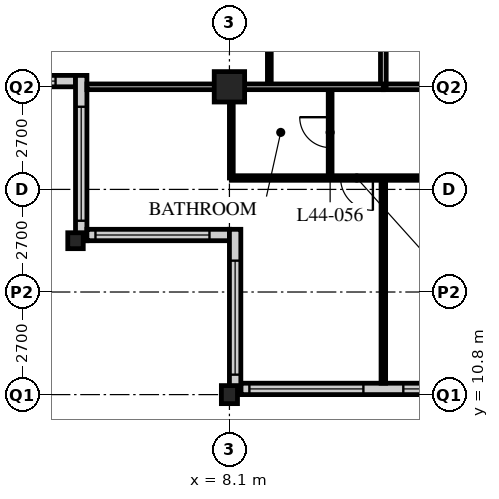
"""IFC4 building model, lengths in metres.
Left out: names, types, materials, properties, quantities, classifications, styles, units other than length and angle.
Written with IfcOpenShell. Run it as: python <this file> out.ifc"""

import sys

from ifc_helpers import new_model, si_unit, direction, frame, frame_2d, origin, origin_2d, place, context, subcontext, project, spatial, rectangle, hollow_rectangle, i_section, extrude, element, fill, save


model = new_model("IFC4")
c1 = context("Model", 3, precision=1e-05, world=origin(), true_north=direction((0.0, 1.0)))
c2 = subcontext(c1, "Body", "Model", "MODEL_VIEW")
j1 = project(units=[si_unit("LENGTHUNIT", "METRE"), si_unit("PLANEANGLEUNIT", "RADIAN")], contexts=[c1])
p1 = place(None, origin())
s1 = spatial("IfcSite", under=j1, at=p1, CompositionType="ELEMENT")
p2 = place(p1, origin())
s2 = spatial("IfcBuilding", under=s1, at=p2, CompositionType="ELEMENT")
p3 = place(p2, frame((0.0, 0.0, 174.0)))
s3 = spatial("IfcBuildingStorey", under=s2, at=p3, CompositionType="ELEMENT", Elevation=174.0)
p4 = place(p3, frame((4.05, 14.85, 0.0), z_axis=(0.0, 0.0, 1.0), x_axis=(1.0, 0.0, 0.0)))
e1 = element("IfcColumn", 1, at=p4, inside=s3, PredefinedType="COLUMN", context=c2, shape_type="SweptSolid", body=[
    extrude(i_section(OverallWidth=0.407, OverallDepth=0.419, WebThickness=0.031, FlangeThickness=0.049, FilletRadius=0.015, at=origin_2d()), origin(), (0.0, 0.0, 1.0), 3.6),
])
p5 = place(p3, frame((8.1, 10.8, 0.0), z_axis=(0.0, 0.0, 1.0), x_axis=(1.0, 0.0, 0.0)))
e2 = element("IfcColumn", 2, at=p5, inside=s3, PredefinedType="COLUMN", context=c2, shape_type="SweptSolid", body=[
    extrude(i_section(OverallWidth=0.424, OverallDepth=0.475, WebThickness=0.048, FlangeThickness=0.077, FilletRadius=0.015, at=origin_2d()), origin(), (0.0, 0.0, 1.0), 3.6),
])
p6 = place(p3, frame((8.1, 18.9, 0.0), z_axis=(0.0, 0.0, 1.0), x_axis=(1.0, 0.0, 0.0)))
e3 = element("IfcColumn", 3, at=p6, inside=s3, PredefinedType="COLUMN", context=c2, shape_type="SweptSolid", body=[
    extrude(hollow_rectangle(XDim=0.8, YDim=0.8, WallThickness=0.08, at=origin_2d()), origin(), (0.0, 0.0, 1.0), 3.6),
])
p7 = place(p3, frame((8.4, 10.95, 0.0), z_axis=(0.0, 0.0, 1.0), x_axis=(1.0, 0.0, 0.0)))
e4 = element("IfcWall", 4, at=p7, inside=s3, PredefinedType="SOLIDWALL", context=c2, shape_type="SweptSolid", body=[
    extrude(rectangle(XDim=40.2, YDim=0.3, at=frame_2d((20.1, 0.0))), origin(), (0.0, 0.0, 1.0), 3.39),
])
p8 = place(p7, frame((0.225, 0.0, 0.6)))
e5 = element("IfcOpeningElement", 5, at=p8, cuts=e4, PredefinedType="OPENING", context=c2, shape_type="SweptSolid", body=[
    extrude(rectangle(XDim=3.0, YDim=2.4, at=frame_2d((1.5, 1.2))), frame((0.0, 0.16, 0.0), z_axis=(0.0, -1.0, 0.0), x_axis=(1.0, 0.0, 0.0)), (0.0, 0.0, 1.0), 0.32),
])
p9 = place(p7, frame((4.275, 0.0, 0.6)))
e6 = element("IfcOpeningElement", 6, at=p9, cuts=e4, PredefinedType="OPENING", context=c2, shape_type="SweptSolid", body=[
    extrude(rectangle(XDim=3.0, YDim=2.4, at=frame_2d((1.5, 1.2))), frame((0.0, 0.16, 0.0), z_axis=(0.0, -1.0, 0.0), x_axis=(1.0, 0.0, 0.0)), (0.0, 0.0, 1.0), 0.32),
])
p10 = place(p7, frame((8.325, 0.0, 0.6)))
e7 = element("IfcOpeningElement", 7, at=p10, cuts=e4, PredefinedType="OPENING", context=c2, shape_type="SweptSolid", body=[
    extrude(rectangle(XDim=3.0, YDim=2.4, at=frame_2d((1.5, 1.2))), frame((0.0, 0.16, 0.0), z_axis=(0.0, -1.0, 0.0), x_axis=(1.0, 0.0, 0.0)), (0.0, 0.0, 1.0), 0.32),
])
p11 = place(p7, frame((12.375, 0.0, 0.6)))
e8 = element("IfcOpeningElement", 8, at=p11, cuts=e4, PredefinedType="OPENING", context=c2, shape_type="SweptSolid", body=[
    extrude(rectangle(XDim=3.0, YDim=2.4, at=frame_2d((1.5, 1.2))), frame((0.0, 0.16, 0.0), z_axis=(0.0, -1.0, 0.0), x_axis=(1.0, 0.0, 0.0)), (0.0, 0.0, 1.0), 0.32),
])
p12 = place(p7, frame((16.425, 0.0, 0.6)))
e9 = element("IfcOpeningElement", 9, at=p12, cuts=e4, PredefinedType="OPENING", context=c2, shape_type="SweptSolid", body=[
    extrude(rectangle(XDim=3.0, YDim=2.4, at=frame_2d((1.5, 1.2))), frame((0.0, 0.16, 0.0), z_axis=(0.0, -1.0, 0.0), x_axis=(1.0, 0.0, 0.0)), (0.0, 0.0, 1.0), 0.32),
])
p13 = place(p7, frame((20.475, 0.0, 0.6)))
e10 = element("IfcOpeningElement", 10, at=p13, cuts=e4, PredefinedType="OPENING", context=c2, shape_type="SweptSolid", body=[
    extrude(rectangle(XDim=3.0, YDim=2.4, at=frame_2d((1.5, 1.2))), frame((0.0, 0.16, 0.0), z_axis=(0.0, -1.0, 0.0), x_axis=(1.0, 0.0, 0.0)), (0.0, 0.0, 1.0), 0.32),
])
p14 = place(p7, frame((24.525, 0.0, 0.6)))
e11 = element("IfcOpeningElement", 11, at=p14, cuts=e4, PredefinedType="OPENING", context=c2, shape_type="SweptSolid", body=[
    extrude(rectangle(XDim=3.0, YDim=2.4, at=frame_2d((1.5, 1.2))), frame((0.0, 0.16, 0.0), z_axis=(0.0, -1.0, 0.0), x_axis=(1.0, 0.0, 0.0)), (0.0, 0.0, 1.0), 0.32),
])
p15 = place(p7, frame((28.575, 0.0, 0.6)))
e12 = element("IfcOpeningElement", 12, at=p15, cuts=e4, PredefinedType="OPENING", context=c2, shape_type="SweptSolid", body=[
    extrude(rectangle(XDim=3.0, YDim=2.4, at=frame_2d((1.5, 1.2))), frame((0.0, 0.16, 0.0), z_axis=(0.0, -1.0, 0.0), x_axis=(1.0, 0.0, 0.0)), (0.0, 0.0, 1.0), 0.32),
])
p16 = place(p7, frame((32.625, 0.0, 0.6)))
e13 = element("IfcOpeningElement", 13, at=p16, cuts=e4, PredefinedType="OPENING", context=c2, shape_type="SweptSolid", body=[
    extrude(rectangle(XDim=3.0, YDim=2.4, at=frame_2d((1.5, 1.2))), frame((0.0, 0.16, 0.0), z_axis=(0.0, -1.0, 0.0), x_axis=(1.0, 0.0, 0.0)), (0.0, 0.0, 1.0), 0.32),
])
p17 = place(p7, frame((36.675, 0.0, 0.6)))
e14 = element("IfcOpeningElement", 14, at=p17, cuts=e4, PredefinedType="OPENING", context=c2, shape_type="SweptSolid", body=[
    extrude(rectangle(XDim=3.0, YDim=2.4, at=frame_2d((1.5, 1.2))), frame((0.0, 0.16, 0.0), z_axis=(0.0, -1.0, 0.0), x_axis=(1.0, 0.0, 0.0)), (0.0, 0.0, 1.0), 0.32),
])
p18 = place(p3, frame((0.3, 19.05, 0.0), z_axis=(0.0, 0.0, 1.0), x_axis=(1.0, 0.0, 0.0)))
e15 = element("IfcWall", 15, at=p18, inside=s3, PredefinedType="SOLIDWALL", context=c2, shape_type="SweptSolid", body=[
    extrude(rectangle(XDim=3.75, YDim=0.3, at=frame_2d((1.875, 0.0))), origin(), (0.0, 0.0, 1.0), 3.39),
])
p19 = place(p18, frame((0.225, 0.0, 0.6)))
e16 = element("IfcOpeningElement", 16, at=p19, cuts=e15, PredefinedType="OPENING", context=c2, shape_type="SweptSolid", body=[
    extrude(rectangle(XDim=3.0, YDim=2.0, at=frame_2d((1.5, 1.0))), frame((0.0, 0.16, 0.0), z_axis=(0.0, -1.0, 0.0), x_axis=(1.0, 0.0, 0.0)), (0.0, 0.0, 1.0), 0.32),
])
p20 = place(p3, frame((4.2, 19.2, 0.0), z_axis=(0.0, 0.0, 1.0), x_axis=(0.0, -1.0, 0.0)))
e17 = element("IfcWall", 17, at=p20, inside=s3, PredefinedType="SOLIDWALL", context=c2, shape_type="SweptSolid", body=[
    extrude(rectangle(XDim=4.35, YDim=0.3, at=frame_2d((2.175, 0.0))), origin(), (0.0, 0.0, 1.0), 3.39),
])
p21 = place(p20, frame((0.825, 0.0, 0.6)))
e18 = element("IfcOpeningElement", 18, at=p21, cuts=e17, PredefinedType="OPENING", context=c2, shape_type="SweptSolid", body=[
    extrude(rectangle(XDim=3.0, YDim=2.0, at=frame_2d((1.5, 1.0))), frame((0.0, 0.16, 0.0), z_axis=(0.0, -1.0, 0.0), x_axis=(1.0, 0.0, 0.0)), (0.0, 0.0, 1.0), 0.32),
])
p22 = place(p3, frame((4.35, 15.0, 0.0), z_axis=(0.0, 0.0, 1.0), x_axis=(1.0, 0.0, 0.0)))
e19 = element("IfcWall", 19, at=p22, inside=s3, PredefinedType="SOLIDWALL", context=c2, shape_type="SweptSolid", body=[
    extrude(rectangle(XDim=3.75, YDim=0.3, at=frame_2d((1.875, 0.0))), origin(), (0.0, 0.0, 1.0), 3.39),
])
p23 = place(p22, frame((0.225, 0.0, 0.6)))
e20 = element("IfcOpeningElement", 20, at=p23, cuts=e19, PredefinedType="OPENING", context=c2, shape_type="SweptSolid", body=[
    extrude(rectangle(XDim=3.0, YDim=2.0, at=frame_2d((1.5, 1.0))), frame((0.0, 0.16, 0.0), z_axis=(0.0, -1.0, 0.0), x_axis=(1.0, 0.0, 0.0)), (0.0, 0.0, 1.0), 0.32),
])
p24 = place(p3, frame((8.25, 15.15, 0.0), z_axis=(0.0, 0.0, 1.0), x_axis=(0.0, -1.0, 0.0)))
e21 = element("IfcWall", 21, at=p24, inside=s3, PredefinedType="SOLIDWALL", context=c2, shape_type="SweptSolid", body=[
    extrude(rectangle(XDim=4.35, YDim=0.3, at=frame_2d((2.175, 0.0))), origin(), (0.0, 0.0, 1.0), 3.39),
])
p25 = place(p24, frame((0.825, 0.0, 0.6)))
e22 = element("IfcOpeningElement", 22, at=p25, cuts=e21, PredefinedType="OPENING", context=c2, shape_type="SweptSolid", body=[
    extrude(rectangle(XDim=3.0, YDim=2.0, at=frame_2d((1.5, 1.0))), frame((0.0, 0.16, 0.0), z_axis=(0.0, -1.0, 0.0), x_axis=(1.0, 0.0, 0.0)), (0.0, 0.0, 1.0), 0.32),
])
p26 = place(p3, frame((12.15, 18.9, 0.0), z_axis=(0.0, 0.0, 1.0), x_axis=(1.0, 0.0, 0.0)))
e23 = element("IfcWall", 23, at=p26, inside=s3, PredefinedType="PARTITIONING", context=c2, shape_type="SweptSolid", body=[
    extrude(rectangle(XDim=32.4, YDim=0.15, at=frame_2d((16.2, 0.0))), origin(), (0.0, 0.0, 1.0), 2.778),
])
p27 = place(p26, frame((6.4, 0.0, 0.0)))
e24 = element("IfcOpeningElement", 24, at=p27, cuts=e23, PredefinedType="OPENING", context=c2, shape_type="SweptSolid", body=[
    extrude(rectangle(XDim=1.0, YDim=2.1, at=frame_2d((0.5, 1.05))), frame((0.0, 0.085, 0.0), z_axis=(0.0, -1.0, 0.0), x_axis=(1.0, 0.0, 0.0)), (0.0, 0.0, 1.0), 0.17),
])
p28 = place(p26, frame((8.8, 0.0, 0.0)))
e25 = element("IfcOpeningElement", 25, at=p28, cuts=e23, PredefinedType="OPENING", context=c2, shape_type="SweptSolid", body=[
    extrude(rectangle(XDim=1.0, YDim=2.1, at=frame_2d((0.5, 1.05))), frame((0.0, 0.085, 0.0), z_axis=(0.0, -1.0, 0.0), x_axis=(1.0, 0.0, 0.0)), (0.0, 0.0, 1.0), 0.17),
])
p29 = place(p26, frame((13.05, 0.0, 0.0)))
e26 = element("IfcOpeningElement", 26, at=p29, cuts=e23, PredefinedType="OPENING", context=c2, shape_type="SweptSolid", body=[
    extrude(rectangle(XDim=1.0, YDim=2.1, at=frame_2d((0.5, 1.05))), frame((0.0, 0.085, 0.0), z_axis=(0.0, -1.0, 0.0), x_axis=(1.0, 0.0, 0.0)), (0.0, 0.0, 1.0), 0.17),
])
p30 = place(p26, frame((22.6, 0.0, 0.0)))
e27 = element("IfcOpeningElement", 27, at=p30, cuts=e23, PredefinedType="OPENING", context=c2, shape_type="SweptSolid", body=[
    extrude(rectangle(XDim=1.0, YDim=2.1, at=frame_2d((0.5, 1.05))), frame((0.0, 0.085, 0.0), z_axis=(0.0, -1.0, 0.0), x_axis=(1.0, 0.0, 0.0)), (0.0, 0.0, 1.0), 0.17),
])
p31 = place(p26, frame((25.0, 0.0, 0.0)))
e28 = element("IfcOpeningElement", 28, at=p31, cuts=e23, PredefinedType="OPENING", context=c2, shape_type="SweptSolid", body=[
    extrude(rectangle(XDim=1.0, YDim=2.1, at=frame_2d((0.5, 1.05))), frame((0.0, 0.085, 0.0), z_axis=(0.0, -1.0, 0.0), x_axis=(1.0, 0.0, 0.0)), (0.0, 0.0, 1.0), 0.17),
])
p32 = place(p26, frame((1.525, 0.0, 0.0)))
e29 = element("IfcOpeningElement", 29, at=p32, cuts=e23, PredefinedType="OPENING", context=c2, shape_type="SweptSolid", body=[
    extrude(rectangle(XDim=1.0, YDim=2.1, at=frame_2d((0.5, 1.05))), frame((0.0, 0.085, 0.0), z_axis=(0.0, -1.0, 0.0), x_axis=(1.0, 0.0, 0.0)), (0.0, 0.0, 1.0), 0.17),
])
p33 = place(p26, frame((29.875, 0.0, 0.0)))
e30 = element("IfcOpeningElement", 30, at=p33, cuts=e23, PredefinedType="OPENING", context=c2, shape_type="SweptSolid", body=[
    extrude(rectangle(XDim=1.0, YDim=2.1, at=frame_2d((0.5, 1.05))), frame((0.0, 0.085, 0.0), z_axis=(0.0, -1.0, 0.0), x_axis=(1.0, 0.0, 0.0)), (0.0, 0.0, 1.0), 0.17),
])
p34 = place(p3, frame((12.15, 18.9, 0.0), z_axis=(0.0, 0.0, 1.0), x_axis=(0.0, 1.0, 0.0)))
e31 = element("IfcWall", 31, at=p34, inside=s3, PredefinedType="PARTITIONING", context=c2, shape_type="SweptSolid", body=[
    extrude(rectangle(XDim=24.3, YDim=0.15, at=frame_2d((12.15, 0.0))), origin(), (0.0, 0.0, 1.0), 3.39),
])
p35 = place(p34, frame((2.35, 0.0, 0.0)))
e32 = element("IfcOpeningElement", 32, at=p35, cuts=e31, PredefinedType="OPENING", context=c2, shape_type="SweptSolid", body=[
    extrude(rectangle(XDim=1.0, YDim=2.1, at=frame_2d((0.5, 1.05))), frame((0.0, 0.085, 0.0), z_axis=(0.0, -1.0, 0.0), x_axis=(1.0, 0.0, 0.0)), (0.0, 0.0, 1.0), 0.17),
])
p36 = place(p34, frame((6.4, 0.0, 0.0)))
e33 = element("IfcOpeningElement", 33, at=p36, cuts=e31, PredefinedType="OPENING", context=c2, shape_type="SweptSolid", body=[
    extrude(rectangle(XDim=1.0, YDim=2.1, at=frame_2d((0.5, 1.05))), frame((0.0, 0.085, 0.0), z_axis=(0.0, -1.0, 0.0), x_axis=(1.0, 0.0, 0.0)), (0.0, 0.0, 1.0), 0.17),
])
p37 = place(p34, frame((8.5, 0.0, 0.0)))
e34 = element("IfcOpeningElement", 34, at=p37, cuts=e31, PredefinedType="OPENING", context=c2, shape_type="SweptSolid", body=[
    extrude(rectangle(XDim=1.0, YDim=2.1, at=frame_2d((0.5, 1.05))), frame((0.0, 0.085, 0.0), z_axis=(0.0, -1.0, 0.0), x_axis=(1.0, 0.0, 0.0)), (0.0, 0.0, 1.0), 0.17),
])
p38 = place(p34, frame((16.6, 0.0, 0.0)))
e35 = element("IfcOpeningElement", 35, at=p38, cuts=e31, PredefinedType="OPENING", context=c2, shape_type="SweptSolid", body=[
    extrude(rectangle(XDim=1.0, YDim=2.1, at=frame_2d((0.5, 1.05))), frame((0.0, 0.085, 0.0), z_axis=(0.0, -1.0, 0.0), x_axis=(1.0, 0.0, 0.0)), (0.0, 0.0, 1.0), 0.17),
])
p39 = place(p3, frame((9.15, 18.9, 0.0), z_axis=(0.0, 0.0, 1.0), x_axis=(0.0, 1.0, 0.0)))
e36 = element("IfcWall", 36, at=p39, inside=s3, PredefinedType="PARTITIONING", context=c2, shape_type="SweptSolid", body=[
    extrude(rectangle(XDim=2.2, YDim=0.1, at=frame_2d((1.1, 0.0))), origin(), (0.0, 0.0, 1.0), 3.39),
])
p40 = place(p3, frame((10.75, 18.9, 0.0), z_axis=(0.0, 0.0, 1.0), x_axis=(0.0, -1.0, 0.0)))
e37 = element("IfcWall", 37, at=p40, inside=s3, PredefinedType="PARTITIONING", context=c2, shape_type="SweptSolid", body=[
    extrude(rectangle(XDim=2.4, YDim=0.1, at=frame_2d((1.2, 0.0))), origin(), (0.0, 0.0, 1.0), 3.39),
])
p41 = place(p40, frame((0.8, 0.0, 0.0)))
e38 = element("IfcOpeningElement", 38, at=p41, cuts=e37, PredefinedType="OPENING", context=c2, shape_type="SweptSolid", body=[
    extrude(rectangle(XDim=0.8, YDim=2.1, at=frame_2d((0.4, 1.05))), frame((0.0, 0.06, 0.0), z_axis=(0.0, -1.0, 0.0), x_axis=(1.0, 0.0, 0.0)), (0.0, 0.0, 1.0), 0.12),
])
p42 = place(p3, frame((8.15, 18.9, 0.0), z_axis=(0.0, 0.0, 1.0), x_axis=(0.0, -1.0, 0.0)))
e39 = element("IfcWall", 39, at=p42, inside=s3, PredefinedType="PARTITIONING", context=c2, shape_type="SweptSolid", body=[
    extrude(rectangle(XDim=2.4, YDim=0.1, at=frame_2d((1.2, 0.0))), origin(), (0.0, 0.0, 1.0), 2.778),
])
p43 = place(p3, frame((8.15, 16.5, 0.0), z_axis=(0.0, 0.0, 1.0), x_axis=(1.0, 0.0, 0.0)))
e40 = element("IfcWall", 40, at=p43, inside=s3, PredefinedType="PARTITIONING", context=c2, shape_type="SweptSolid", body=[
    extrude(rectangle(XDim=8.05, YDim=0.12, at=frame_2d((4.025, 0.0))), origin(), (0.0, 0.0, 1.0), 3.39),
])
p44 = place(p43, frame((6.725, 0.0, 0.0)))
e41 = element("IfcOpeningElement", 41, at=p44, cuts=e40, PredefinedType="OPENING", context=c2, shape_type="SweptSolid", body=[
    extrude(rectangle(XDim=0.85, YDim=2.1, at=frame_2d((0.425, 1.05))), frame((0.0, 0.07, 0.0), z_axis=(0.0, -1.0, 0.0), x_axis=(1.0, 0.0, 0.0)), (0.0, 0.0, 1.0), 0.14),
])
p45 = place(p43, frame((2.875, 0.0, 0.0)))
e42 = element("IfcOpeningElement", 42, at=p45, cuts=e40, PredefinedType="OPENING", context=c2, shape_type="SweptSolid", body=[
    extrude(rectangle(XDim=0.85, YDim=2.1, at=frame_2d((0.425, 1.05))), frame((0.0, 0.07, 0.0), z_axis=(0.0, -1.0, 0.0), x_axis=(1.0, 0.0, 0.0)), (0.0, 0.0, 1.0), 0.14),
])
p46 = place(p3, frame((12.15, 16.5, 0.0), z_axis=(0.0, 0.0, 1.0), x_axis=(0.0, -1.0, 0.0)))
e43 = element("IfcWall", 43, at=p46, inside=s3, PredefinedType="PARTITIONING", context=c2, shape_type="SweptSolid", body=[
    extrude(rectangle(XDim=5.4, YDim=0.12, at=frame_2d((2.7, 0.0))), origin(), (0.0, 0.0, 1.0), 3.39),
])
p47 = place(p3, frame((4.35, 18.9, 0.0), z_axis=(0.0, 0.0, 1.0), x_axis=(1.0, 0.0, 0.0)))
e44 = element("IfcWall", 44, at=p47, inside=s3, PredefinedType="PARTITIONING", context=c2, shape_type="SweptSolid", body=[
    extrude(rectangle(XDim=7.8, YDim=0.15, at=frame_2d((3.9, 0.0))), origin(), (0.0, 0.0, 1.0), 2.778),
])
p48 = place(p8, origin())
e45 = element("IfcWindow", 45, at=p48, inside=s3, PartitioningType="SINGLE_PANEL", PredefinedType="WINDOW", context=c2, shape_type="SweptSolid", body=[
    extrude(rectangle(XDim=3.0, YDim=2.4, at=frame_2d((1.5, 1.2))), frame((0.0, 0.03, 0.0), z_axis=(0.0, -1.0, 0.0), x_axis=(1.0, 0.0, 0.0)), (0.0, 0.0, 1.0), 0.06),
])
fill(e5, e45)
p49 = place(p9, origin())
e46 = element("IfcWindow", 46, at=p49, inside=s3, PartitioningType="SINGLE_PANEL", PredefinedType="WINDOW", context=c2, shape_type="SweptSolid", body=[
    extrude(rectangle(XDim=3.0, YDim=2.4, at=frame_2d((1.5, 1.2))), frame((0.0, 0.03, 0.0), z_axis=(0.0, -1.0, 0.0), x_axis=(1.0, 0.0, 0.0)), (0.0, 0.0, 1.0), 0.06),
])
fill(e6, e46)
p50 = place(p19, origin())
e47 = element("IfcWindow", 47, at=p50, inside=s3, PartitioningType="SINGLE_PANEL", PredefinedType="WINDOW", context=c2, shape_type="SweptSolid", body=[
    extrude(rectangle(XDim=3.0, YDim=2.0, at=frame_2d((1.5, 1.0))), frame((0.0, 0.03, 0.0), z_axis=(0.0, -1.0, 0.0), x_axis=(1.0, 0.0, 0.0)), (0.0, 0.0, 1.0), 0.06),
])
fill(e16, e47)
p51 = place(p21, origin())
e48 = element("IfcWindow", 48, at=p51, inside=s3, PartitioningType="SINGLE_PANEL", PredefinedType="WINDOW", context=c2, shape_type="SweptSolid", body=[
    extrude(rectangle(XDim=3.0, YDim=2.0, at=frame_2d((1.5, 1.0))), frame((0.0, 0.03, 0.0), z_axis=(0.0, -1.0, 0.0), x_axis=(1.0, 0.0, 0.0)), (0.0, 0.0, 1.0), 0.06),
])
fill(e18, e48)
p52 = place(p23, origin())
e49 = element("IfcWindow", 49, at=p52, inside=s3, PartitioningType="SINGLE_PANEL", PredefinedType="WINDOW", context=c2, shape_type="SweptSolid", body=[
    extrude(rectangle(XDim=3.0, YDim=2.0, at=frame_2d((1.5, 1.0))), frame((0.0, 0.03, 0.0), z_axis=(0.0, -1.0, 0.0), x_axis=(1.0, 0.0, 0.0)), (0.0, 0.0, 1.0), 0.06),
])
fill(e20, e49)
p53 = place(p25, origin())
e50 = element("IfcWindow", 50, at=p53, inside=s3, PartitioningType="SINGLE_PANEL", PredefinedType="WINDOW", context=c2, shape_type="SweptSolid", body=[
    extrude(rectangle(XDim=3.0, YDim=2.0, at=frame_2d((1.5, 1.0))), frame((0.0, 0.03, 0.0), z_axis=(0.0, -1.0, 0.0), x_axis=(1.0, 0.0, 0.0)), (0.0, 0.0, 1.0), 0.06),
])
fill(e22, e50)
p54 = place(p41, origin())
e51 = element("IfcDoor", 51, at=p54, inside=s3, OperationType="SINGLE_SWING_RIGHT", PredefinedType="DOOR", context=c2, shape_type="SweptSolid", body=[
    extrude(rectangle(XDim=0.8, YDim=2.1, at=frame_2d((0.4, 1.05))), frame((0.0, 0.025, 0.0), z_axis=(0.0, -1.0, 0.0), x_axis=(1.0, 0.0, 0.0)), (0.0, 0.0, 1.0), 0.05),
])
fill(e38, e51)
p55 = place(p45, origin())
e52 = element("IfcDoor", 52, at=p55, inside=s3, OperationType="SINGLE_SWING_LEFT", PredefinedType="DOOR", context=c2, shape_type="SweptSolid", body=[
    extrude(rectangle(XDim=0.85, YDim=2.1, at=frame_2d((0.425, 1.05))), frame((0.0, 0.025, 0.0), z_axis=(0.0, -1.0, 0.0), x_axis=(1.0, 0.0, 0.0)), (0.0, 0.0, 1.0), 0.05),
])
fill(e42, e52)
save(model, sys.argv[1])
